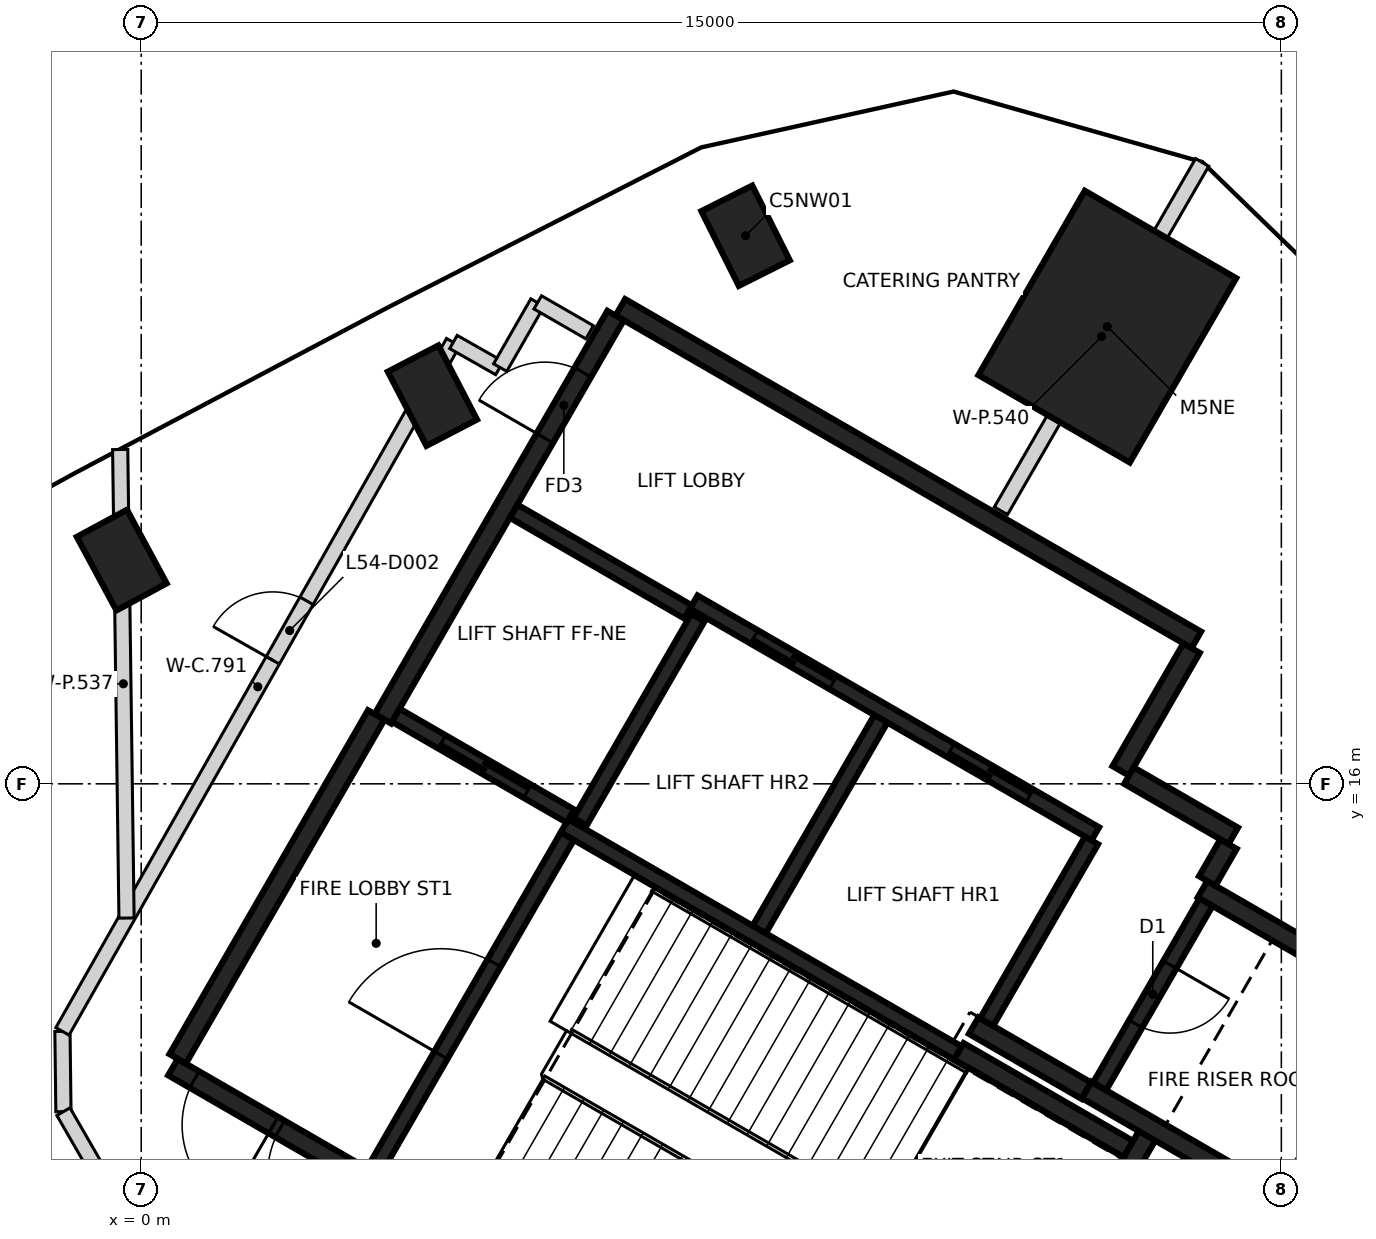
"""IFC4 building model, lengths in metres.
Left out: names, types, materials, properties, quantities, classifications, styles, units other than length and angle.
Written with IfcOpenShell. Run it as: python <this file> out.ifc"""

import sys

from ifc_helpers import new_model, si_unit, direction, frame, frame_2d, origin, origin_2d, place, context, subcontext, project, spatial, rectangle, extrude, element, fill, save


model = new_model("IFC4")
c1 = context("Model", 3, precision=1e-05, world=origin(), true_north=direction((0.0, 1.0)))
c2 = subcontext(c1, "Body", "Model", "MODEL_VIEW")
j1 = project(units=[si_unit("LENGTHUNIT", "METRE"), si_unit("PLANEANGLEUNIT", "RADIAN")], contexts=[c1])
p1 = place(None, origin())
s1 = spatial("IfcSite", under=j1, at=p1, CompositionType="ELEMENT")
p2 = place(p1, origin())
s2 = spatial("IfcBuilding", under=s1, at=p2, CompositionType="ELEMENT")
p3 = place(p2, frame((0.0, 0.0, 216.4)))
s3 = spatial("IfcBuildingStorey", under=s2, at=p3, CompositionType="ELEMENT", Elevation=216.4)
for number, where, z_axis, x_axis in (
    (1, (7.951, 23.211, -0.35), (0.0, 0.0, 1.0), (-0.449, 0.894, 0.0)),
    (2, (3.832, 21.107, -0.35), (0.0, 0.0, 1.0), (-0.461, 0.887, 0.0)),
    (3, (-0.256, 18.943, -0.35), (0.0, 0.0, 1.0), (-0.475, 0.88, 0.0)),
):
    element("IfcColumn", number, at=place(p3, frame(where, z_axis=z_axis, x_axis=x_axis)), inside=s3, PredefinedType="COLUMN", context=c2, shape_type="SweptSolid", body=[
        extrude(rectangle(XDim=1.1, YDim=0.75, at=origin_2d()), origin(), (0.0, 0.0, 1.0), 5.0),
    ])
p4 = place(p3, frame((12.71, 22.015, -0.35), z_axis=(0.0, 0.0, 1.0), x_axis=(0.5, 0.866025403784, 0.0)))
e4 = element("IfcColumn", 4, at=p4, inside=s3, PredefinedType="COLUMN", context=c2, shape_type="SweptSolid", body=[
    extrude(rectangle(XDim=2.8, YDim=2.3, at=origin_2d()), origin(), (0.0, 0.0, 1.0), 5.0),
])
p5 = place(p3, frame((10.42, 6.498, 0.0), z_axis=(0.0, 0.0, 1.0), x_axis=(-0.866021906294, 0.500006057782, 0.0)))
e5 = element("IfcWall", 5, at=p5, inside=s3, PredefinedType="SHEAR", context=c2, shape_type="SweptSolid", body=[
    extrude(rectangle(XDim=11.55, YDim=0.25, at=frame_2d((5.775, 0.0))), origin(), (0.0, 0.0, 1.0), 4.65),
])
p6 = place(p5, frame((10.025, 0.0, 0.0)))
e6 = element("IfcOpeningElement", 6, at=p6, cuts=e5, PredefinedType="OPENING", context=c2, shape_type="SweptSolid", body=[
    extrude(rectangle(XDim=1.2, YDim=2.1, at=frame_2d((0.6, 1.05))), frame((0.0, 0.135, 0.0), z_axis=(0.0, -1.0, 0.0), x_axis=(1.0, 0.0, 0.0)), (0.0, 0.0, 1.0), 0.27),
])
p7 = place(p5, frame((8.725, 0.0, 0.0)))
e7 = element("IfcOpeningElement", 7, at=p7, cuts=e5, PredefinedType="OPENING", context=c2, shape_type="SweptSolid", body=[
    extrude(rectangle(XDim=1.2, YDim=2.1, at=frame_2d((0.6, 1.05))), frame((0.0, 0.135, 0.0), z_axis=(0.0, -1.0, 0.0), x_axis=(1.0, 0.0, 0.0)), (0.0, 0.0, 1.0), 0.27),
])
p8 = place(p3, frame((6.304, 22.269, 0.0), z_axis=(0.0, 0.0, 1.0), x_axis=(0.866022959057, -0.500004234368, 0.0)))
e8 = element("IfcWall", 8, at=p8, inside=s3, PredefinedType="SHEAR", context=c2, shape_type="SweptSolid", body=[
    extrude(rectangle(XDim=8.75, YDim=0.25, at=frame_2d((4.375, 0.0))), origin(), (0.0, 0.0, 1.0), 4.65),
])
p9 = place(p3, frame((3.179, 16.856, 0.0), z_axis=(0.0, 0.0, 1.0), x_axis=(0.500001955336, 0.866024274868, 0.0)))
e9 = element("IfcWall", 9, at=p9, inside=s3, PredefinedType="SHEAR", context=c2, shape_type="SweptSolid", body=[
    extrude(rectangle(XDim=6.125, YDim=0.25, at=frame_2d((3.062, 0.0))), origin(), (0.0, 0.0, 1.0), 4.65),
])
p10 = place(p9, frame((4.263, 0.0, 0.0)))
e10 = element("IfcOpeningElement", 10, at=p10, cuts=e9, PredefinedType="OPENING", context=c2, shape_type="SweptSolid", body=[
    extrude(rectangle(XDim=1.0, YDim=2.1, at=frame_2d((0.5, 1.05))), frame((0.0, 0.135, 0.0), z_axis=(0.0, -1.0, 0.0), x_axis=(1.0, 0.0, 0.0)), (0.0, 0.0, 1.0), 0.27),
])
p11 = place(p3, frame((0.48, 12.381, 0.0), z_axis=(0.0, 0.0, 1.0), x_axis=(0.49999885962, 0.866026062182, 0.0)))
e11 = element("IfcWall", 11, at=p11, inside=s3, PredefinedType="SHEAR", context=c2, shape_type="SweptSolid", body=[
    extrude(rectangle(XDim=5.225, YDim=0.25, at=frame_2d((2.612, 0.0))), origin(), (0.0, 0.0, 1.0), 4.65),
])
p12 = place(p3, frame((13.238, 11.378, 0.0), z_axis=(0.0, 0.0, 1.0), x_axis=(-0.500008851346, -0.866020293397, 0.0)))
e12 = element("IfcWall", 12, at=p12, inside=s3, PredefinedType="SHEAR", context=c2, shape_type="SweptSolid", body=[
    extrude(rectangle(XDim=5.51, YDim=0.25, at=frame_2d((2.755, 0.0))), origin(), (0.0, 0.0, 1.0), 4.65),
])
p13 = place(p3, frame((16.684, 13.347, 0.0), z_axis=(0.0, 0.0, 1.0), x_axis=(-0.499998874531, -0.866026053573, 0.0)))
e13 = element("IfcWall", 13, at=p13, inside=s3, PredefinedType="SHEAR", context=c2, shape_type="SweptSolid", body=[
    extrude(rectangle(XDim=3.313, YDim=0.25, at=frame_2d((1.656, 0.0))), origin(), (0.0, 0.0, 1.0), 4.65),
])
p14 = place(p3, frame((14.918, 10.54, 0.0), z_axis=(0.0, 0.0, 1.0), x_axis=(-0.866063538972, 0.499933942099, 0.0)))
e14 = element("IfcWall", 14, at=p14, inside=s3, PredefinedType="SHEAR", context=c2, shape_type="SweptSolid", body=[
    extrude(rectangle(XDim=2.865, YDim=0.25, at=frame_2d((1.432, 0.0))), origin(), (0.0, 0.0, 1.0), 4.65),
])
p15 = place(p3, frame((13.963, 14.614, 0.0), z_axis=(0.0, 0.0, 1.0), x_axis=(0.866042235819, -0.499970844928, 0.0)))
e15 = element("IfcWall", 15, at=p15, inside=s3, PredefinedType="SHEAR", context=c2, shape_type="SweptSolid", body=[
    extrude(rectangle(XDim=2.865, YDim=0.25, at=frame_2d((1.432, 0.0))), origin(), (0.0, 0.0, 1.0), 4.65),
])
p16 = place(p3, frame((10.757, 12.481, 0.0), z_axis=(0.0, 0.0, 1.0), x_axis=(0.866022940537, -0.500004266446, 0.0)))
e16 = element("IfcWall", 16, at=p16, inside=s3, PredefinedType="SHEAR", context=c2, shape_type="SweptSolid", body=[
    extrude(rectangle(XDim=2.575, YDim=0.25, at=frame_2d((1.287, 0.0))), origin(), (0.0, 0.0, 1.0), 4.65),
])
p17 = place(p3, frame((13.819, 17.785, 0.0), z_axis=(0.0, 0.0, 1.0), x_axis=(-0.500039802285, -0.866002422705, 0.0)))
e17 = element("IfcWall", 17, at=p17, inside=s3, PredefinedType="SHEAR", context=c2, shape_type="SweptSolid", body=[
    extrude(rectangle(XDim=1.865, YDim=0.25, at=frame_2d((0.932, 0.0))), origin(), (0.0, 0.0, 1.0), 4.65),
])
p18 = place(p3, frame((12.433, 11.964, 0.0), z_axis=(0.0, 0.0, 1.0), x_axis=(-0.866038183914, 0.499977863513, 0.0)))
e18 = element("IfcWall", 18, at=p18, inside=s3, PredefinedType="SHEAR", context=c2, shape_type="SweptSolid", body=[
    extrude(rectangle(XDim=1.71, YDim=0.25, at=frame_2d((0.855, 0.0))), origin(), (0.0, 0.0, 1.0), 4.65),
])
p19 = place(p3, frame((12.995, 16.108, 0.0), z_axis=(0.0, 0.0, 1.0), x_axis=(0.866044474677, -0.49996696679, 0.0)))
e19 = element("IfcWall", 19, at=p19, inside=s3, PredefinedType="SHEAR", context=c2, shape_type="SweptSolid", body=[
    extrude(rectangle(XDim=1.584, YDim=0.25, at=frame_2d((0.792, 0.0))), origin(), (0.0, 0.0, 1.0), 4.65),
])
p20 = place(p3, frame((14.305, 15.207, 0.0), z_axis=(0.0, 0.0, 1.0), x_axis=(-0.499848422343, -0.866112899501, 0.0)))
e20 = element("IfcWall", 20, at=p20, inside=s3, PredefinedType="SHEAR", context=c2, shape_type="SweptSolid", body=[
    extrude(rectangle(XDim=0.559, YDim=0.25, at=frame_2d((0.28, 0.0))), origin(), (0.0, 0.0, 1.0), 4.65),
])
p21 = place(p3, frame((12.552, 15.342, 0.0), z_axis=(0.0, 0.0, 1.0), x_axis=(-0.866030299012, 0.499991521122, 0.0)))
e21 = element("IfcWall", 21, at=p21, inside=s3, PredefinedType="SHEAR", context=c2, shape_type="SweptSolid", body=[
    extrude(rectangle(XDim=6.1, YDim=0.2, at=frame_2d((3.05, 0.0))), origin(), (0.0, 0.0, 1.0), 4.65),
])
p22 = place(p21, frame((1.0, 0.0, 0.0)))
e22 = element("IfcOpeningElement", 22, at=p22, cuts=e21, PredefinedType="OPENING", context=c2, shape_type="SweptSolid", body=[
    extrude(rectangle(XDim=1.2, YDim=2.1, at=frame_2d((0.6, 1.05))), frame((0.0, 0.11, 0.0), z_axis=(0.0, -1.0, 0.0), x_axis=(1.0, 0.0, 0.0)), (0.0, 0.0, 1.0), 0.22),
])
p23 = place(p21, frame((3.982, 0.0, 0.0)))
e23 = element("IfcOpeningElement", 23, at=p23, cuts=e21, PredefinedType="OPENING", context=c2, shape_type="SweptSolid", body=[
    extrude(rectangle(XDim=1.2, YDim=2.1, at=frame_2d((0.6, 1.05))), frame((0.0, 0.11, 0.0), z_axis=(0.0, -1.0, 0.0), x_axis=(1.0, 0.0, 0.0)), (0.0, 0.0, 1.0), 0.22),
])
p24 = place(p3, frame((10.743, 12.46, 0.0), z_axis=(0.0, 0.0, 1.0), x_axis=(-0.866018848283, 0.500011354289, 0.0)))
e24 = element("IfcWall", 24, at=p24, inside=s3, PredefinedType="SHEAR", context=c2, shape_type="SweptSolid", body=[
    extrude(rectangle(XDim=5.974, YDim=0.2, at=frame_2d((2.987, 0.0))), origin(), (0.0, 0.0, 1.0), 4.65),
])
p25 = place(p3, frame((3.057, 10.895, 0.0), z_axis=(0.0, 0.0, 1.0), x_axis=(0.500027839223, 0.866009330205, 0.0)))
e25 = element("IfcWall", 25, at=p25, inside=s3, PredefinedType="SHEAR", context=c2, shape_type="SweptSolid", body=[
    extrude(rectangle(XDim=5.098, YDim=0.2, at=frame_2d((2.549, 0.0))), origin(), (0.0, 0.0, 1.0), 4.65),
])
p26 = place(p25, frame((1.774, 0.0, 0.0)))
e26 = element("IfcOpeningElement", 26, at=p26, cuts=e25, PredefinedType="OPENING", context=c2, shape_type="SweptSolid", body=[
    extrude(rectangle(XDim=1.4, YDim=2.1, at=frame_2d((0.7, 1.05))), frame((0.0, 0.11, 0.0), z_axis=(0.0, -1.0, 0.0), x_axis=(1.0, 0.0, 0.0)), (0.0, 0.0, 1.0), 0.22),
])
p27 = place(p3, frame((8.132, 14.084, 0.0), z_axis=(0.0, 0.0, 1.0), x_axis=(0.500030834389, 0.86600760081, 0.0)))
e27 = element("IfcWall", 27, at=p27, inside=s3, PredefinedType="SHEAR", context=c2, shape_type="SweptSolid", body=[
    extrude(rectangle(XDim=3.198, YDim=0.2, at=frame_2d((1.599, 0.0))), origin(), (0.0, 0.0, 1.0), 4.65),
])
p28 = place(p3, frame((14.008, 14.442, 0.0), z_axis=(0.0, 0.0, 1.0), x_axis=(-0.499986818241, -0.866033014143, 0.0)))
e28 = element("IfcWall", 28, at=p28, inside=s3, PredefinedType="SHEAR", context=c2, shape_type="SweptSolid", body=[
    extrude(rectangle(XDim=2.798, YDim=0.2, at=frame_2d((1.399, 0.0))), origin(), (0.0, 0.0, 1.0), 4.65),
])
p29 = place(p28, frame((0.949, 0.0, 0.0)))
e29 = element("IfcOpeningElement", 29, at=p29, cuts=e28, PredefinedType="OPENING", context=c2, shape_type="SweptSolid", body=[
    extrude(rectangle(XDim=0.9, YDim=2.1, at=frame_2d((0.45, 1.05))), frame((0.0, 0.11, 0.0), z_axis=(0.0, -1.0, 0.0), x_axis=(1.0, 0.0, 0.0)), (0.0, 0.0, 1.0), 0.22),
])
p30 = place(p3, frame((12.502, 15.255, 0.0), z_axis=(0.0, 0.0, 1.0), x_axis=(-0.499965018551, -0.866045599391, 0.0)))
e30 = element("IfcWall", 30, at=p30, inside=s3, PredefinedType="SHEAR", context=c2, shape_type="SweptSolid", body=[
    extrude(rectangle(XDim=2.759, YDim=0.2, at=frame_2d((1.379, 0.0))), origin(), (0.0, 0.0, 1.0), 4.65),
])
p31 = place(p3, frame((7.324, 18.187, 0.0), z_axis=(0.0, 0.0, 1.0), x_axis=(-0.499967891604, -0.866043940782, 0.0)))
e31 = element("IfcWall", 31, at=p31, inside=s3, PredefinedType="SHEAR", context=c2, shape_type="SweptSolid", body=[
    extrude(rectangle(XDim=3.1, YDim=0.2, at=frame_2d((1.55, 0.0))), origin(), (0.0, 0.0, 1.0), 4.65),
])
p32 = place(p3, frame((5.646, 15.576, 0.0), z_axis=(0.0, 0.0, 1.0), x_axis=(-0.866018407898, 0.500012117035, 0.0)))
e32 = element("IfcWall", 32, at=p32, inside=s3, PredefinedType="SHEAR", context=c2, shape_type="SweptSolid", body=[
    extrude(rectangle(XDim=2.651, YDim=0.2, at=frame_2d((1.325, 0.0))), origin(), (0.0, 0.0, 1.0), 4.65),
])
p33 = place(p32, frame((0.652, 0.0, 0.0)))
e33 = element("IfcOpeningElement", 33, at=p33, cuts=e32, PredefinedType="OPENING", context=c2, shape_type="SweptSolid", body=[
    extrude(rectangle(XDim=1.3, YDim=2.1, at=frame_2d((0.65, 1.05))), frame((0.0, 0.11, 0.0), z_axis=(0.0, -1.0, 0.0), x_axis=(1.0, 0.0, 0.0)), (0.0, 0.0, 1.0), 0.22),
])
p34 = place(p3, frame((7.196, 18.26, 0.0), z_axis=(0.0, 0.0, 1.0), x_axis=(-0.866018407898, 0.500012117035, 0.0)))
e34 = element("IfcWall", 34, at=p34, inside=s3, PredefinedType="SHEAR", context=c2, shape_type="SweptSolid", body=[
    extrude(rectangle(XDim=2.651, YDim=0.2, at=frame_2d((1.325, 0.0))), origin(), (0.0, 0.0, 1.0), 4.65),
])
p35 = place(p3, frame((-1.036, 12.743, 0.0), z_axis=(0.0, 0.0, 1.0), x_axis=(0.012253415255, -0.999924924089, 0.0)))
e35 = element("IfcWall", 35, at=p35, inside=s3, PredefinedType="PARTITIONING", context=c2, shape_type="SweptSolid", body=[
    extrude(rectangle(XDim=1.056, YDim=0.2, at=frame_2d((0.528, 0.0))), origin(), (0.0, 0.0, 1.0), 4.65),
])
p36 = place(p3, frame((-1.036, 12.743, 0.0), z_axis=(0.0, 0.0, 1.0), x_axis=(0.49314672747, 0.869946150739, 0.0)))
e36 = element("IfcWall", 36, at=p36, inside=s3, PredefinedType="PARTITIONING", context=c2, shape_type="SweptSolid", body=[
    extrude(rectangle(XDim=10.423, YDim=0.2, at=frame_2d((5.211, 0.0))), origin(), (0.0, 0.0, 1.0), 3.75),
])
p37 = place(p36, frame((5.612, 0.0, 0.0)))
e37 = element("IfcOpeningElement", 37, at=p37, cuts=e36, PredefinedType="OPENING", context=c2, shape_type="SweptSolid", body=[
    extrude(rectangle(XDim=0.9, YDim=2.1, at=frame_2d((0.45, 1.05))), frame((0.0, 0.11, 0.0), z_axis=(0.0, -1.0, 0.0), x_axis=(1.0, 0.0, 0.0)), (0.0, 0.0, 1.0), 0.22),
])
p38 = place(p3, frame((-1.023, 11.687, 0.0), z_axis=(0.0, 0.0, 1.0), x_axis=(0.499692660748, -0.866202773486, 0.0)))
e38 = element("IfcWall", 38, at=p38, inside=s3, PredefinedType="PARTITIONING", context=c2, shape_type="SweptSolid", body=[
    extrude(rectangle(XDim=1.419, YDim=0.2, at=frame_2d((0.709, 0.0))), origin(), (0.0, 0.0, 1.0), 4.65),
])
p39 = place(p3, frame((4.108, 21.813, 0.0), z_axis=(0.0, 0.0, 1.0), x_axis=(0.869298985779, -0.494286630735, 0.0)))
e39 = element("IfcWall", 39, at=p39, inside=s3, PredefinedType="PARTITIONING", context=c2, shape_type="SweptSolid", body=[
    extrude(rectangle(XDim=0.696, YDim=0.2, at=frame_2d((0.348, 0.0))), origin(), (0.0, 0.0, 1.0), 3.75),
])
p40 = place(p3, frame((4.723, 21.476, 0.0), z_axis=(0.0, 0.0, 1.0), x_axis=(0.497232452162, 0.867617362964, 0.0)))
e40 = element("IfcWall", 40, at=p40, inside=s3, PredefinedType="PARTITIONING", context=c2, shape_type="SweptSolid", body=[
    extrude(rectangle(XDim=0.985, YDim=0.2, at=frame_2d((0.493, 0.0))), origin(), (0.0, 0.0, 1.0), 3.75),
])
p41 = place(p3, frame((5.217, 22.334, 0.0), z_axis=(0.0, 0.0, 1.0), x_axis=(0.866293770924, -0.499534886128, 0.0)))
e41 = element("IfcWall", 41, at=p41, inside=s3, PredefinedType="PARTITIONING", context=c2, shape_type="SweptSolid", body=[
    extrude(rectangle(XDim=0.789, YDim=0.2, at=frame_2d((0.395, 0.0))), origin(), (0.0, 0.0, 1.0), 3.75),
])
p42 = place(p3, frame((-0.276, 20.398, 0.0), z_axis=(0.0, 0.0, 1.0), x_axis=(0.013504253847, -0.999908813407, 0.0)))
e42 = element("IfcWall", 42, at=p42, inside=s3, PredefinedType="PARTITIONING", context=c2, shape_type="SweptSolid", body=[
    extrude(rectangle(XDim=6.165, YDim=0.2, at=frame_2d((3.083, 0.0))), origin(), (0.0, 0.0, 1.0), 4.65),
])
p43 = place(p3, frame((11.311, 19.592, 0.0), z_axis=(0.0, 0.0, 1.0), x_axis=(0.500132351176, 0.865948977311, 0.0)))
e43 = element("IfcWall", 43, at=p43, inside=s3, PredefinedType="PARTITIONING", context=c2, shape_type="SweptSolid", body=[
    extrude(rectangle(XDim=5.293, YDim=0.2, at=frame_2d((2.646, 0.0))), origin(), (0.0, 0.0, 1.0), 4.65),
])
p44 = place(p33, origin())
e44 = element("IfcDoor", 44, at=p44, inside=s3, OperationType="SLIDING_TO_RIGHT", PredefinedType="DOOR", context=c2, shape_type="SweptSolid", body=[
    extrude(rectangle(XDim=1.3, YDim=2.1, at=frame_2d((0.65, 1.05))), frame((0.0, 0.025, 0.0), z_axis=(0.0, -1.0, 0.0), x_axis=(1.0, 0.0, 0.0)), (0.0, 0.0, 1.0), 0.05),
])
fill(e33, e44)
p45 = place(p22, origin())
e45 = element("IfcDoor", 45, at=p45, inside=s3, OperationType="DOUBLE_DOOR_SLIDING", PredefinedType="DOOR", context=c2, shape_type="SweptSolid", body=[
    extrude(rectangle(XDim=1.2, YDim=2.1, at=frame_2d((0.6, 1.05))), frame((0.0, 0.025, 0.0), z_axis=(0.0, -1.0, 0.0), x_axis=(1.0, 0.0, 0.0)), (0.0, 0.0, 1.0), 0.05),
])
fill(e22, e45)
p46 = place(p23, origin())
e46 = element("IfcDoor", 46, at=p46, inside=s3, OperationType="DOUBLE_DOOR_SLIDING", PredefinedType="DOOR", context=c2, shape_type="SweptSolid", body=[
    extrude(rectangle(XDim=1.2, YDim=2.1, at=frame_2d((0.6, 1.05))), frame((0.0, 0.025, 0.0), z_axis=(0.0, -1.0, 0.0), x_axis=(1.0, 0.0, 0.0)), (0.0, 0.0, 1.0), 0.05),
])
fill(e23, e46)
p47 = place(p10, origin())
e47 = element("IfcDoor", 47, at=p47, inside=s3, OperationType="SINGLE_SWING_LEFT", PredefinedType="DOOR", context=c2, shape_type="SweptSolid", body=[
    extrude(rectangle(XDim=1.0, YDim=2.1, at=frame_2d((0.5, 1.05))), frame((0.0, 0.025, 0.0), z_axis=(0.0, -1.0, 0.0), x_axis=(1.0, 0.0, 0.0)), (0.0, 0.0, 1.0), 0.05),
])
fill(e10, e47)
p48 = place(p6, origin())
e48 = element("IfcDoor", 48, at=p48, inside=s3, OperationType="SINGLE_SWING_LEFT", PredefinedType="DOOR", context=c2, shape_type="SweptSolid", body=[
    extrude(rectangle(XDim=1.2, YDim=2.1, at=frame_2d((0.6, 1.05))), frame((0.0, 0.025, 0.0), z_axis=(0.0, -1.0, 0.0), x_axis=(1.0, 0.0, 0.0)), (0.0, 0.0, 1.0), 0.05),
])
fill(e6, e48)
p49 = place(p7, origin())
e49 = element("IfcDoor", 49, at=p49, inside=s3, OperationType="SINGLE_SWING_RIGHT", PredefinedType="DOOR", context=c2, shape_type="SweptSolid", body=[
    extrude(rectangle(XDim=1.2, YDim=2.1, at=frame_2d((0.6, 1.05))), frame((0.0, 0.025, 0.0), z_axis=(0.0, -1.0, 0.0), x_axis=(1.0, 0.0, 0.0)), (0.0, 0.0, 1.0), 0.05),
])
fill(e7, e49)
p50 = place(p26, origin())
e50 = element("IfcDoor", 50, at=p50, inside=s3, OperationType="SINGLE_SWING_RIGHT", PredefinedType="DOOR", context=c2, shape_type="SweptSolid", body=[
    extrude(rectangle(XDim=1.4, YDim=2.1, at=frame_2d((0.7, 1.05))), frame((0.0, 0.025, 0.0), z_axis=(0.0, -1.0, 0.0), x_axis=(1.0, 0.0, 0.0)), (0.0, 0.0, 1.0), 0.05),
])
fill(e26, e50)
p51 = place(p29, origin())
e51 = element("IfcDoor", 51, at=p51, inside=s3, OperationType="SINGLE_SWING_LEFT", PredefinedType="DOOR", context=c2, shape_type="SweptSolid", body=[
    extrude(rectangle(XDim=0.9, YDim=2.1, at=frame_2d((0.45, 1.05))), frame((0.0, 0.025, 0.0), z_axis=(0.0, -1.0, 0.0), x_axis=(1.0, 0.0, 0.0)), (0.0, 0.0, 1.0), 0.05),
])
fill(e29, e51)
p52 = place(p37, origin())
e52 = element("IfcDoor", 52, at=p52, inside=s3, OperationType="SINGLE_SWING_LEFT", PredefinedType="DOOR", context=c2, shape_type="SweptSolid", body=[
    extrude(rectangle(XDim=0.9, YDim=2.1, at=frame_2d((0.45, 1.05))), frame((0.0, 0.025, 0.0), z_axis=(0.0, -1.0, 0.0), x_axis=(1.0, 0.0, 0.0)), (0.0, 0.0, 1.0), 0.05),
])
fill(e37, e52)
save(model, sys.argv[1])
